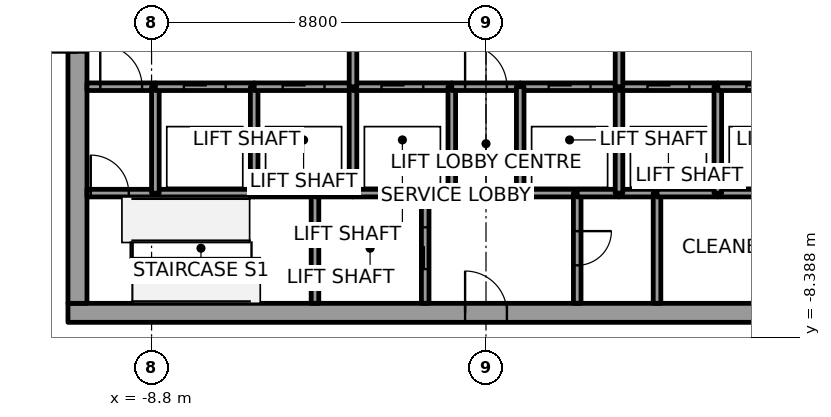
"""IFC4 building model, lengths in metres.
Left out: names, types, materials, properties, quantities, classifications, styles, units other than length and angle.
Written with IfcOpenShell. Run it as: python <this file> out.ifc"""

import sys

from ifc_helpers import new_model, si_unit, direction, frame, frame_2d, origin, place, context, subcontext, project, spatial, rectangle, extrude, element, fill, save


model = new_model("IFC4")
c1 = context("Model", 3, precision=1e-05, world=origin(), true_north=direction((0.0, 1.0)))
c2 = subcontext(c1, "Body", "Model", "MODEL_VIEW")
j1 = project(units=[si_unit("LENGTHUNIT", "METRE"), si_unit("PLANEANGLEUNIT", "RADIAN")], contexts=[c1])
p1 = place(None, origin())
s1 = spatial("IfcSite", under=j1, at=p1, CompositionType="ELEMENT")
p2 = place(p1, origin())
s2 = spatial("IfcBuilding", under=s1, at=p2, CompositionType="ELEMENT")
p3 = place(p2, frame((0.0, 0.0, 177.8)))
s3 = spatial("IfcBuildingStorey", under=s2, at=p3, CompositionType="ELEMENT", Elevation=177.8)
p4 = place(p3, frame((-11.0, -7.75, 0.0), z_axis=(0.0, 0.0, 1.0), x_axis=(1.0, 0.0, 0.0)))
e1 = element("IfcWall", 1, at=p4, inside=s3, PredefinedType="SHEAR", context=c2, shape_type="SweptSolid", body=[
    extrude(rectangle(XDim=22.0, YDim=0.5, at=frame_2d((11.0, 0.0))), origin(), (0.0, 0.0, 1.0), 4.0),
])
p5 = place(p4, frame((10.45, 0.0, 0.0)))
e2 = element("IfcOpeningElement", 2, at=p5, cuts=e1, PredefinedType="OPENING", context=c2, shape_type="SweptSolid", body=[
    extrude(rectangle(XDim=1.1, YDim=2.1, at=frame_2d((0.55, 1.05))), frame((0.0, 0.25, 0.0), z_axis=(0.0, -1.0, 0.0), x_axis=(1.0, 0.0, 0.0)), (0.0, 0.0, 1.0), 0.5),
])
p6 = place(p3, frame((-10.75, -7.5, 0.0), z_axis=(0.0, 0.0, 1.0), x_axis=(0.0, 1.0, 0.0)))
e3 = element("IfcWall", 3, at=p6, inside=s3, PredefinedType="SHEAR", context=c2, shape_type="SweptSolid", body=[
    extrude(rectangle(XDim=15.0, YDim=0.5, at=frame_2d((7.5, 0.0))), origin(), (0.0, 0.0, 1.0), 4.0),
])
p7 = place(p6, frame((6.6, 0.0, 0.0)))
e4 = element("IfcOpeningElement", 4, at=p7, cuts=e3, PredefinedType="OPENING", context=c2, shape_type="SweptSolid", body=[
    extrude(rectangle(XDim=1.8, YDim=2.1, at=frame_2d((0.9, 1.05))), frame((0.0, 0.25, 0.0), z_axis=(0.0, -1.0, 0.0), x_axis=(1.0, 0.0, 0.0)), (0.0, 0.0, 1.0), 0.5),
])
p8 = place(p3, frame((-10.5, -4.6, 0.0), z_axis=(0.0, 0.0, 1.0), x_axis=(1.0, 0.0, 0.0)))
e5 = element("IfcWall", 5, at=p8, inside=s3, PredefinedType="SOLIDWALL", context=c2, shape_type="SweptSolid", body=[
    extrude(rectangle(XDim=1.8, YDim=0.2, at=frame_2d((0.9, 0.0))), origin(), (0.0, 0.0, 1.0), 3.85),
])
p9 = place(p8, frame((0.1, 0.0, 0.0)))
e6 = element("IfcOpeningElement", 6, at=p9, cuts=e5, PredefinedType="OPENING", context=c2, shape_type="SweptSolid", body=[
    extrude(rectangle(XDim=1.0, YDim=2.1, at=frame_2d((0.5, 1.05))), frame((0.0, 0.1, 0.0), z_axis=(0.0, -1.0, 0.0), x_axis=(1.0, 0.0, 0.0)), (0.0, 0.0, 1.0), 0.2),
])
p10 = place(p3, frame((-10.5, -1.8, 0.0), z_axis=(0.0, 0.0, 1.0), x_axis=(1.0, 0.0, 0.0)))
e7 = element("IfcWall", 7, at=p10, inside=s3, PredefinedType="SOLIDWALL", context=c2, shape_type="SweptSolid", body=[
    extrude(rectangle(XDim=1.8, YDim=0.2, at=frame_2d((0.9, 0.0))), origin(), (0.0, 0.0, 1.0), 3.85),
])
p11 = place(p10, frame((0.35, 0.0, 0.0)))
e8 = element("IfcOpeningElement", 8, at=p11, cuts=e7, PredefinedType="OPENING", context=c2, shape_type="SweptSolid", body=[
    extrude(rectangle(XDim=1.1, YDim=2.1, at=frame_2d((0.55, 1.05))), frame((0.0, 0.1, 0.0), z_axis=(0.0, -1.0, 0.0), x_axis=(1.0, 0.0, 0.0)), (0.0, 0.0, 1.0), 0.2),
])
p12 = place(p3, frame((-8.7, -4.6, 0.0), z_axis=(0.0, 0.0, 1.0), x_axis=(1.0, 0.0, 0.0)))
e9 = element("IfcWall", 9, at=p12, inside=s3, PredefinedType="SOLIDWALL", context=c2, shape_type="SweptSolid", body=[
    extrude(rectangle(XDim=2.6, YDim=0.2, at=frame_2d((1.3, 0.0))), origin(), (0.0, 0.0, 1.0), 3.85),
])
p13 = place(p3, frame((-8.7, -4.6, 0.0), z_axis=(0.0, 0.0, 1.0), x_axis=(0.0, 1.0, 0.0)))
e10 = element("IfcWall", 10, at=p13, inside=s3, PredefinedType="SOLIDWALL", context=c2, shape_type="SweptSolid", body=[
    extrude(rectangle(XDim=2.8, YDim=0.2, at=frame_2d((1.4, 0.0))), origin(), (0.0, 0.0, 1.0), 3.85),
])
p14 = place(p3, frame((-8.7, -1.8, 0.0), z_axis=(0.0, 0.0, 1.0), x_axis=(1.0, 0.0, 0.0)))
e11 = element("IfcWall", 11, at=p14, inside=s3, PredefinedType="SOLIDWALL", context=c2, shape_type="SweptSolid", body=[
    extrude(rectangle(XDim=2.6, YDim=0.2, at=frame_2d((1.3, 0.0))), origin(), (0.0, 0.0, 1.0), 3.85),
])
p15 = place(p14, frame((0.75, 0.0, 0.0)))
e12 = element("IfcOpeningElement", 12, at=p15, cuts=e11, PredefinedType="OPENING", context=c2, shape_type="SweptSolid", body=[
    extrude(rectangle(XDim=1.1, YDim=2.1, at=frame_2d((0.55, 1.05))), frame((0.0, 0.1, 0.0), z_axis=(0.0, -1.0, 0.0), x_axis=(1.0, 0.0, 0.0)), (0.0, 0.0, 1.0), 0.2),
])
p16 = place(p3, frame((-6.1, -4.6, 0.0), z_axis=(0.0, 0.0, 1.0), x_axis=(1.0, 0.0, 0.0)))
e13 = element("IfcWall", 13, at=p16, inside=s3, PredefinedType="SOLIDWALL", context=c2, shape_type="SweptSolid", body=[
    extrude(rectangle(XDim=1.6, YDim=0.2, at=frame_2d((0.8, 0.0))), origin(), (0.0, 0.0, 1.0), 3.85),
])
p17 = place(p3, frame((-6.1, -4.6, 0.0), z_axis=(0.0, 0.0, 1.0), x_axis=(0.0, 1.0, 0.0)))
e14 = element("IfcWall", 14, at=p17, inside=s3, PredefinedType="SOLIDWALL", context=c2, shape_type="SweptSolid", body=[
    extrude(rectangle(XDim=2.8, YDim=0.2, at=frame_2d((1.4, 0.0))), origin(), (0.0, 0.0, 1.0), 3.85),
])
p18 = place(p3, frame((-6.1, -1.8, 0.0), z_axis=(0.0, 0.0, 1.0), x_axis=(1.0, 0.0, 0.0)))
e15 = element("IfcWall", 15, at=p18, inside=s3, PredefinedType="SOLIDWALL", context=c2, shape_type="SweptSolid", body=[
    extrude(rectangle(XDim=2.6, YDim=0.2, at=frame_2d((1.3, 0.0))), origin(), (0.0, 0.0, 1.0), 3.85),
])
p19 = place(p18, frame((0.75, 0.0, 0.0)))
e16 = element("IfcOpeningElement", 16, at=p19, cuts=e15, PredefinedType="OPENING", context=c2, shape_type="SweptSolid", body=[
    extrude(rectangle(XDim=1.1, YDim=2.1, at=frame_2d((0.55, 1.05))), frame((0.0, 0.1, 0.0), z_axis=(0.0, -1.0, 0.0), x_axis=(1.0, 0.0, 0.0)), (0.0, 0.0, 1.0), 0.2),
])
p20 = place(p3, frame((-4.5, -4.6, 0.0), z_axis=(0.0, 0.0, 1.0), x_axis=(0.0, -1.0, 0.0)))
e17 = element("IfcWall", 17, at=p20, inside=s3, PredefinedType="SOLIDWALL", context=c2, shape_type="SweptSolid", body=[
    extrude(rectangle(XDim=2.9, YDim=0.2, at=frame_2d((1.45, 0.0))), origin(), (0.0, 0.0, 1.0), 3.85),
])
p21 = place(p3, frame((-4.5, -4.6, 0.0), z_axis=(0.0, 0.0, 1.0), x_axis=(1.0, 0.0, 0.0)))
e18 = element("IfcWall", 18, at=p21, inside=s3, PredefinedType="SOLIDWALL", context=c2, shape_type="SweptSolid", body=[
    extrude(rectangle(XDim=1.0, YDim=0.2, at=frame_2d((0.5, 0.0))), origin(), (0.0, 0.0, 1.0), 3.85),
])
p22 = place(p3, frame((-3.5, -4.6, 0.0), z_axis=(0.0, 0.0, 1.0), x_axis=(1.0, 0.0, 0.0)))
e19 = element("IfcWall", 19, at=p22, inside=s3, PredefinedType="SOLIDWALL", context=c2, shape_type="SweptSolid", body=[
    extrude(rectangle(XDim=1.9, YDim=0.2, at=frame_2d((0.95, 0.0))), origin(), (0.0, 0.0, 1.0), 3.85),
])
p23 = place(p3, frame((-3.5, -4.6, 0.0), z_axis=(0.0, 0.0, 1.0), x_axis=(0.0, 1.0, 0.0)))
e20 = element("IfcWall", 20, at=p23, inside=s3, PredefinedType="SOLIDWALL", context=c2, shape_type="SweptSolid", body=[
    extrude(rectangle(XDim=2.8, YDim=0.2, at=frame_2d((1.4, 0.0))), origin(), (0.0, 0.0, 1.0), 3.85),
])
p24 = place(p3, frame((-3.5, -1.8, 0.0), z_axis=(0.0, 0.0, 1.0), x_axis=(1.0, 0.0, 0.0)))
e21 = element("IfcWall", 21, at=p24, inside=s3, PredefinedType="SOLIDWALL", context=c2, shape_type="SweptSolid", body=[
    extrude(rectangle(XDim=2.6, YDim=0.2, at=frame_2d((1.3, 0.0))), origin(), (0.0, 0.0, 1.0), 3.85),
])
p25 = place(p24, frame((0.75, 0.0, 0.0)))
e22 = element("IfcOpeningElement", 22, at=p25, cuts=e21, PredefinedType="OPENING", context=c2, shape_type="SweptSolid", body=[
    extrude(rectangle(XDim=1.1, YDim=2.1, at=frame_2d((0.55, 1.05))), frame((0.0, 0.1, 0.0), z_axis=(0.0, -1.0, 0.0), x_axis=(1.0, 0.0, 0.0)), (0.0, 0.0, 1.0), 0.2),
])
p26 = place(p3, frame((-3.5, 1.8, 0.0), z_axis=(0.0, 0.0, 1.0), x_axis=(0.0, -1.0, 0.0)))
e23 = element("IfcWall", 23, at=p26, inside=s3, PredefinedType="SOLIDWALL", context=c2, shape_type="SweptSolid", body=[
    extrude(rectangle(XDim=3.6, YDim=0.2, at=frame_2d((1.8, 0.0))), origin(), (0.0, 0.0, 1.0), 3.85),
])
p27 = place(p26, frame((1.05, 0.0, 0.0)))
e24 = element("IfcOpeningElement", 24, at=p27, cuts=e23, PredefinedType="OPENING", context=c2, shape_type="SweptSolid", body=[
    extrude(rectangle(XDim=1.5, YDim=2.1, at=frame_2d((0.75, 1.05))), frame((0.0, 0.1, 0.0), z_axis=(0.0, -1.0, 0.0), x_axis=(1.0, 0.0, 0.0)), (0.0, 0.0, 1.0), 0.2),
])
p28 = place(p3, frame((-1.6, -7.5, 0.0), z_axis=(0.0, 0.0, 1.0), x_axis=(0.0, 1.0, 0.0)))
e25 = element("IfcWall", 25, at=p28, inside=s3, PredefinedType="SOLIDWALL", context=c2, shape_type="SweptSolid", body=[
    extrude(rectangle(XDim=2.9, YDim=0.2, at=frame_2d((1.45, 0.0))), origin(), (0.0, 0.0, 1.0), 3.85),
])
p29 = place(p28, frame((0.9, 0.0, 0.0)))
e26 = element("IfcOpeningElement", 26, at=p29, cuts=e25, PredefinedType="OPENING", context=c2, shape_type="SweptSolid", body=[
    extrude(rectangle(XDim=1.1, YDim=2.1, at=frame_2d((0.55, 1.05))), frame((0.0, 0.1, 0.0), z_axis=(0.0, -1.0, 0.0), x_axis=(1.0, 0.0, 0.0)), (0.0, 0.0, 1.0), 0.2),
])
p30 = place(p3, frame((-1.6, -4.6, 0.0), z_axis=(0.0, 0.0, 1.0), x_axis=(1.0, 0.0, 0.0)))
e27 = element("IfcWall", 27, at=p30, inside=s3, PredefinedType="SOLIDWALL", context=c2, shape_type="SweptSolid", body=[
    extrude(rectangle(XDim=0.7, YDim=0.2, at=frame_2d((0.35, 0.0))), origin(), (0.0, 0.0, 1.0), 3.85),
])
p31 = place(p3, frame((-0.9, -4.6, 0.0), z_axis=(0.0, 0.0, 1.0), x_axis=(0.0, 1.0, 0.0)))
e28 = element("IfcWall", 28, at=p31, inside=s3, PredefinedType="SOLIDWALL", context=c2, shape_type="SweptSolid", body=[
    extrude(rectangle(XDim=2.8, YDim=0.2, at=frame_2d((1.4, 0.0))), origin(), (0.0, 0.0, 1.0), 3.85),
])
p32 = place(p3, frame((-0.9, -1.8, 0.0), z_axis=(0.0, 0.0, 1.0), x_axis=(1.0, 0.0, 0.0)))
e29 = element("IfcWall", 29, at=p32, inside=s3, PredefinedType="SOLIDWALL", context=c2, shape_type="SweptSolid", body=[
    extrude(rectangle(XDim=1.8, YDim=0.2, at=frame_2d((0.9, 0.0))), origin(), (0.0, 0.0, 1.0), 3.85),
])
p33 = place(p32, frame((0.35, 0.0, 0.0)))
e30 = element("IfcOpeningElement", 30, at=p33, cuts=e29, PredefinedType="OPENING", context=c2, shape_type="SweptSolid", body=[
    extrude(rectangle(XDim=1.1, YDim=2.1, at=frame_2d((0.55, 1.05))), frame((0.0, 0.1, 0.0), z_axis=(0.0, -1.0, 0.0), x_axis=(1.0, 0.0, 0.0)), (0.0, 0.0, 1.0), 0.2),
])
p34 = place(p3, frame((0.9, -1.8, 0.0), z_axis=(0.0, 0.0, 1.0), x_axis=(1.0, 0.0, 0.0)))
e31 = element("IfcWall", 31, at=p34, inside=s3, PredefinedType="SOLIDWALL", context=c2, shape_type="SweptSolid", body=[
    extrude(rectangle(XDim=2.6, YDim=0.2, at=frame_2d((1.3, 0.0))), origin(), (0.0, 0.0, 1.0), 3.85),
])
p35 = place(p34, frame((0.75, 0.0, 0.0)))
e32 = element("IfcOpeningElement", 32, at=p35, cuts=e31, PredefinedType="OPENING", context=c2, shape_type="SweptSolid", body=[
    extrude(rectangle(XDim=1.1, YDim=2.1, at=frame_2d((0.55, 1.05))), frame((0.0, 0.1, 0.0), z_axis=(0.0, -1.0, 0.0), x_axis=(1.0, 0.0, 0.0)), (0.0, 0.0, 1.0), 0.2),
])
p36 = place(p3, frame((0.9, -1.8, 0.0), z_axis=(0.0, 0.0, 1.0), x_axis=(0.0, -1.0, 0.0)))
e33 = element("IfcWall", 33, at=p36, inside=s3, PredefinedType="SOLIDWALL", context=c2, shape_type="SweptSolid", body=[
    extrude(rectangle(XDim=2.8, YDim=0.2, at=frame_2d((1.4, 0.0))), origin(), (0.0, 0.0, 1.0), 3.85),
])
p37 = place(p3, frame((0.9, -4.6, 0.0), z_axis=(0.0, 0.0, 1.0), x_axis=(1.0, 0.0, 0.0)))
e34 = element("IfcWall", 34, at=p37, inside=s3, PredefinedType="SOLIDWALL", context=c2, shape_type="SweptSolid", body=[
    extrude(rectangle(XDim=1.5, YDim=0.2, at=frame_2d((0.75, 0.0))), origin(), (0.0, 0.0, 1.0), 3.85),
])
p38 = place(p3, frame((2.4, -4.6, 0.0), z_axis=(0.0, 0.0, 1.0), x_axis=(0.0, -1.0, 0.0)))
e35 = element("IfcWall", 35, at=p38, inside=s3, PredefinedType="SOLIDWALL", context=c2, shape_type="SweptSolid", body=[
    extrude(rectangle(XDim=2.9, YDim=0.2, at=frame_2d((1.45, 0.0))), origin(), (0.0, 0.0, 1.0), 3.85),
])
p39 = place(p38, frame((1.0, 0.0, 0.0)))
e36 = element("IfcOpeningElement", 36, at=p39, cuts=e35, PredefinedType="OPENING", context=c2, shape_type="SweptSolid", body=[
    extrude(rectangle(XDim=0.9, YDim=2.1, at=frame_2d((0.45, 1.05))), frame((0.0, 0.1, 0.0), z_axis=(0.0, -1.0, 0.0), x_axis=(1.0, 0.0, 0.0)), (0.0, 0.0, 1.0), 0.2),
])
p40 = place(p3, frame((3.5, -4.6, 0.0), z_axis=(0.0, 0.0, 1.0), x_axis=(-1.0, 0.0, 0.0)))
e37 = element("IfcWall", 37, at=p40, inside=s3, PredefinedType="SOLIDWALL", context=c2, shape_type="SweptSolid", body=[
    extrude(rectangle(XDim=1.1, YDim=0.2, at=frame_2d((0.55, 0.0))), origin(), (0.0, 0.0, 1.0), 3.85),
])
p41 = place(p3, frame((4.5, -4.6, 0.0), z_axis=(0.0, 0.0, 1.0), x_axis=(-1.0, 0.0, 0.0)))
e38 = element("IfcWall", 38, at=p41, inside=s3, PredefinedType="SOLIDWALL", context=c2, shape_type="SweptSolid", body=[
    extrude(rectangle(XDim=1.0, YDim=0.2, at=frame_2d((0.5, 0.0))), origin(), (0.0, 0.0, 1.0), 3.85),
])
p42 = place(p3, frame((3.5, -4.6, 0.0), z_axis=(0.0, 0.0, 1.0), x_axis=(0.0, 1.0, 0.0)))
e39 = element("IfcWall", 39, at=p42, inside=s3, PredefinedType="SOLIDWALL", context=c2, shape_type="SweptSolid", body=[
    extrude(rectangle(XDim=2.8, YDim=0.2, at=frame_2d((1.4, 0.0))), origin(), (0.0, 0.0, 1.0), 3.85),
])
p43 = place(p3, frame((3.5, -1.8, 0.0), z_axis=(0.0, 0.0, 1.0), x_axis=(1.0, 0.0, 0.0)))
e40 = element("IfcWall", 40, at=p43, inside=s3, PredefinedType="SOLIDWALL", context=c2, shape_type="SweptSolid", body=[
    extrude(rectangle(XDim=2.6, YDim=0.2, at=frame_2d((1.3, 0.0))), origin(), (0.0, 0.0, 1.0), 3.85),
])
p44 = place(p43, frame((0.75, 0.0, 0.0)))
e41 = element("IfcOpeningElement", 41, at=p44, cuts=e40, PredefinedType="OPENING", context=c2, shape_type="SweptSolid", body=[
    extrude(rectangle(XDim=1.1, YDim=2.1, at=frame_2d((0.55, 1.05))), frame((0.0, 0.1, 0.0), z_axis=(0.0, -1.0, 0.0), x_axis=(1.0, 0.0, 0.0)), (0.0, 0.0, 1.0), 0.2),
])
p45 = place(p3, frame((3.5, -1.8, 0.0), z_axis=(0.0, 0.0, 1.0), x_axis=(0.0, 1.0, 0.0)))
e42 = element("IfcWall", 42, at=p45, inside=s3, PredefinedType="SOLIDWALL", context=c2, shape_type="SweptSolid", body=[
    extrude(rectangle(XDim=3.6, YDim=0.2, at=frame_2d((1.8, 0.0))), origin(), (0.0, 0.0, 1.0), 3.85),
])
p46 = place(p45, frame((1.05, 0.0, 0.0)))
e43 = element("IfcOpeningElement", 43, at=p46, cuts=e42, PredefinedType="OPENING", context=c2, shape_type="SweptSolid", body=[
    extrude(rectangle(XDim=1.5, YDim=2.1, at=frame_2d((0.75, 1.05))), frame((0.0, 0.1, 0.0), z_axis=(0.0, -1.0, 0.0), x_axis=(1.0, 0.0, 0.0)), (0.0, 0.0, 1.0), 0.2),
])
p47 = place(p3, frame((4.5, -4.6, 0.0), z_axis=(0.0, 0.0, 1.0), x_axis=(0.0, -1.0, 0.0)))
e44 = element("IfcWall", 44, at=p47, inside=s3, PredefinedType="SOLIDWALL", context=c2, shape_type="SweptSolid", body=[
    extrude(rectangle(XDim=2.9, YDim=0.2, at=frame_2d((1.45, 0.0))), origin(), (0.0, 0.0, 1.0), 3.85),
])
p48 = place(p3, frame((6.1, -4.6, 0.0), z_axis=(0.0, 0.0, 1.0), x_axis=(-1.0, 0.0, 0.0)))
e45 = element("IfcWall", 45, at=p48, inside=s3, PredefinedType="SOLIDWALL", context=c2, shape_type="SweptSolid", body=[
    extrude(rectangle(XDim=1.6, YDim=0.2, at=frame_2d((0.8, 0.0))), origin(), (0.0, 0.0, 1.0), 3.85),
])
p49 = place(p3, frame((8.7, -4.6, 0.0), z_axis=(0.0, 0.0, 1.0), x_axis=(-1.0, 0.0, 0.0)))
e46 = element("IfcWall", 46, at=p49, inside=s3, PredefinedType="SOLIDWALL", context=c2, shape_type="SweptSolid", body=[
    extrude(rectangle(XDim=2.6, YDim=0.2, at=frame_2d((1.3, 0.0))), origin(), (0.0, 0.0, 1.0), 3.85),
])
p50 = place(p3, frame((6.1, -4.6, 0.0), z_axis=(0.0, 0.0, 1.0), x_axis=(0.0, 1.0, 0.0)))
e47 = element("IfcWall", 47, at=p50, inside=s3, PredefinedType="SOLIDWALL", context=c2, shape_type="SweptSolid", body=[
    extrude(rectangle(XDim=2.8, YDim=0.2, at=frame_2d((1.4, 0.0))), origin(), (0.0, 0.0, 1.0), 3.85),
])
p51 = place(p3, frame((6.1, -1.8, 0.0), z_axis=(0.0, 0.0, 1.0), x_axis=(1.0, 0.0, 0.0)))
e48 = element("IfcWall", 48, at=p51, inside=s3, PredefinedType="SOLIDWALL", context=c2, shape_type="SweptSolid", body=[
    extrude(rectangle(XDim=2.6, YDim=0.2, at=frame_2d((1.3, 0.0))), origin(), (0.0, 0.0, 1.0), 3.85),
])
p52 = place(p51, frame((0.75, 0.0, 0.0)))
e49 = element("IfcOpeningElement", 49, at=p52, cuts=e48, PredefinedType="OPENING", context=c2, shape_type="SweptSolid", body=[
    extrude(rectangle(XDim=1.1, YDim=2.1, at=frame_2d((0.55, 1.05))), frame((0.0, 0.1, 0.0), z_axis=(0.0, -1.0, 0.0), x_axis=(1.0, 0.0, 0.0)), (0.0, 0.0, 1.0), 0.2),
])
p53 = place(p15, origin())
e50 = element("IfcDoor", 50, at=p53, inside=s3, OperationType="SLIDING_TO_LEFT", PredefinedType="DOOR", context=c2, shape_type="SweptSolid", body=[
    extrude(rectangle(XDim=1.1, YDim=2.1, at=frame_2d((0.55, 1.05))), frame((0.0, 0.025, 0.0), z_axis=(0.0, -1.0, 0.0), x_axis=(1.0, 0.0, 0.0)), (0.0, 0.0, 1.0), 0.05),
])
fill(e12, e50)
p54 = place(p19, origin())
e51 = element("IfcDoor", 51, at=p54, inside=s3, OperationType="SLIDING_TO_LEFT", PredefinedType="DOOR", context=c2, shape_type="SweptSolid", body=[
    extrude(rectangle(XDim=1.1, YDim=2.1, at=frame_2d((0.55, 1.05))), frame((0.0, 0.025, 0.0), z_axis=(0.0, -1.0, 0.0), x_axis=(1.0, 0.0, 0.0)), (0.0, 0.0, 1.0), 0.05),
])
fill(e16, e51)
p55 = place(p25, origin())
e52 = element("IfcDoor", 52, at=p55, inside=s3, OperationType="SLIDING_TO_LEFT", PredefinedType="DOOR", context=c2, shape_type="SweptSolid", body=[
    extrude(rectangle(XDim=1.1, YDim=2.1, at=frame_2d((0.55, 1.05))), frame((0.0, 0.025, 0.0), z_axis=(0.0, -1.0, 0.0), x_axis=(1.0, 0.0, 0.0)), (0.0, 0.0, 1.0), 0.05),
])
fill(e22, e52)
p56 = place(p35, origin())
e53 = element("IfcDoor", 53, at=p56, inside=s3, OperationType="SLIDING_TO_RIGHT", PredefinedType="DOOR", context=c2, shape_type="SweptSolid", body=[
    extrude(rectangle(XDim=1.1, YDim=2.1, at=frame_2d((0.55, 1.05))), frame((0.0, 0.025, 0.0), z_axis=(0.0, -1.0, 0.0), x_axis=(1.0, 0.0, 0.0)), (0.0, 0.0, 1.0), 0.05),
])
fill(e32, e53)
p57 = place(p44, origin())
e54 = element("IfcDoor", 54, at=p57, inside=s3, OperationType="SLIDING_TO_LEFT", PredefinedType="DOOR", context=c2, shape_type="SweptSolid", body=[
    extrude(rectangle(XDim=1.1, YDim=2.1, at=frame_2d((0.55, 1.05))), frame((0.0, 0.025, 0.0), z_axis=(0.0, -1.0, 0.0), x_axis=(1.0, 0.0, 0.0)), (0.0, 0.0, 1.0), 0.05),
])
fill(e41, e54)
p58 = place(p52, origin())
e55 = element("IfcDoor", 55, at=p58, inside=s3, OperationType="SLIDING_TO_RIGHT", PredefinedType="DOOR", context=c2, shape_type="SweptSolid", body=[
    extrude(rectangle(XDim=1.1, YDim=2.1, at=frame_2d((0.55, 1.05))), frame((0.0, 0.025, 0.0), z_axis=(0.0, -1.0, 0.0), x_axis=(1.0, 0.0, 0.0)), (0.0, 0.0, 1.0), 0.05),
])
fill(e49, e55)
p59 = place(p29, origin())
e56 = element("IfcDoor", 56, at=p59, inside=s3, OperationType="SLIDING_TO_RIGHT", PredefinedType="DOOR", context=c2, shape_type="SweptSolid", body=[
    extrude(rectangle(XDim=1.1, YDim=2.1, at=frame_2d((0.55, 1.05))), frame((0.0, 0.025, 0.0), z_axis=(0.0, -1.0, 0.0), x_axis=(1.0, 0.0, 0.0)), (0.0, 0.0, 1.0), 0.05),
])
fill(e26, e56)
p60 = place(p11, origin())
e57 = element("IfcDoor", 57, at=p60, inside=s3, OperationType="SINGLE_SWING_LEFT", PredefinedType="DOOR", context=c2, shape_type="SweptSolid", body=[
    extrude(rectangle(XDim=1.1, YDim=2.1, at=frame_2d((0.55, 1.05))), frame((0.0, 0.025, 0.0), z_axis=(0.0, -1.0, 0.0), x_axis=(1.0, 0.0, 0.0)), (0.0, 0.0, 1.0), 0.05),
])
fill(e8, e57)
p61 = place(p33, origin())
e58 = element("IfcDoor", 58, at=p61, inside=s3, OperationType="SINGLE_SWING_LEFT", PredefinedType="DOOR", context=c2, shape_type="SweptSolid", body=[
    extrude(rectangle(XDim=1.1, YDim=2.1, at=frame_2d((0.55, 1.05))), frame((0.0, 0.025, 0.0), z_axis=(0.0, -1.0, 0.0), x_axis=(1.0, 0.0, 0.0)), (0.0, 0.0, 1.0), 0.05),
])
fill(e30, e58)
p62 = place(p9, origin())
e59 = element("IfcDoor", 59, at=p62, inside=s3, OperationType="SINGLE_SWING_LEFT", PredefinedType="DOOR", context=c2, shape_type="SweptSolid", body=[
    extrude(rectangle(XDim=1.0, YDim=2.1, at=frame_2d((0.5, 1.05))), frame((0.0, 0.025, 0.0), z_axis=(0.0, -1.0, 0.0), x_axis=(1.0, 0.0, 0.0)), (0.0, 0.0, 1.0), 0.05),
])
fill(e6, e59)
p63 = place(p39, origin())
e60 = element("IfcDoor", 60, at=p63, inside=s3, OperationType="SINGLE_SWING_LEFT", PredefinedType="DOOR", context=c2, shape_type="SweptSolid", body=[
    extrude(rectangle(XDim=0.9, YDim=2.1, at=frame_2d((0.45, 1.05))), frame((0.0, 0.025, 0.0), z_axis=(0.0, -1.0, 0.0), x_axis=(1.0, 0.0, 0.0)), (0.0, 0.0, 1.0), 0.05),
])
fill(e36, e60)
p64 = place(p7, origin())
e61 = element("IfcDoor", 61, at=p64, inside=s3, OperationType="DOUBLE_DOOR_SINGLE_SWING", PredefinedType="DOOR", context=c2, shape_type="SweptSolid", body=[
    extrude(rectangle(XDim=1.8, YDim=2.1, at=frame_2d((0.9, 1.05))), frame((0.0, 0.025, 0.0), z_axis=(0.0, -1.0, 0.0), x_axis=(1.0, 0.0, 0.0)), (0.0, 0.0, 1.0), 0.05),
])
fill(e4, e61)
p65 = place(p5, origin())
e62 = element("IfcDoor", 62, at=p65, inside=s3, OperationType="SINGLE_SWING_RIGHT", PredefinedType="DOOR", context=c2, shape_type="SweptSolid", body=[
    extrude(rectangle(XDim=1.1, YDim=2.1, at=frame_2d((0.55, 1.05))), frame((0.0, 0.025, 0.0), z_axis=(0.0, -1.0, 0.0), x_axis=(1.0, 0.0, 0.0)), (0.0, 0.0, 1.0), 0.05),
])
fill(e2, e62)
save(model, sys.argv[1])
